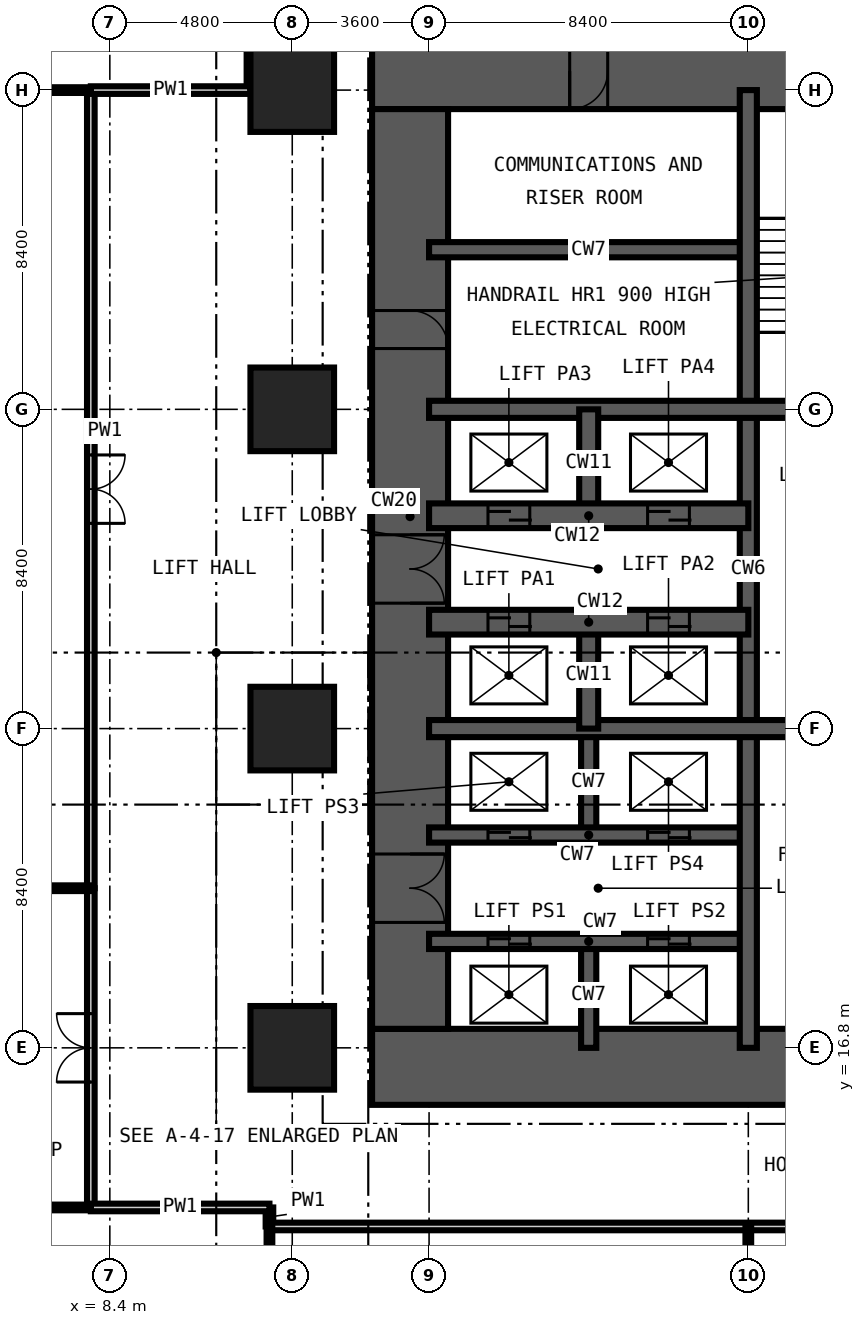
"""IFC4 building model, lengths in metres.
Left out: names, types, materials, properties, quantities, classifications, styles, units other than length and angle.
Written with IfcOpenShell. Run it as: python <this file> out.ifc"""

import sys

from ifc_helpers import new_model, si_unit, direction, frame, frame_2d, origin, origin_2d, place, context, subcontext, project, spatial, rectangle, extrude, element, fill, save


model = new_model("IFC4")
c1 = context("Model", 3, precision=1e-05, world=origin(), true_north=direction((0.0, 1.0)))
c2 = subcontext(c1, "Body", "Model", "MODEL_VIEW")
j1 = project(units=[si_unit("LENGTHUNIT", "METRE"), si_unit("PLANEANGLEUNIT", "RADIAN")], contexts=[c1])
p1 = place(None, origin())
s1 = spatial("IfcSite", under=j1, at=p1, CompositionType="ELEMENT")
p2 = place(p1, origin())
s2 = spatial("IfcBuilding", under=s1, at=p2, CompositionType="ELEMENT")
p3 = place(p2, origin())
s3 = spatial("IfcBuildingStorey", under=s2, at=p3, CompositionType="ELEMENT", Elevation=0.0)
for number, where, z_axis, x_axis in (
    (1, (13.2, 16.8, -0.3), (0.0, 0.0, 1.0), (1.0, 0.0, 0.0)),
    (2, (13.2, 25.2, -0.3), (0.0, 0.0, 1.0), (1.0, 0.0, 0.0)),
    (3, (13.2, 33.6, -0.3), (0.0, 0.0, 1.0), (1.0, 0.0, 0.0)),
    (4, (13.2, 42.0, -0.3), (0.0, 0.0, 1.0), (1.0, 0.0, 0.0)),
):
    element("IfcColumn", number, at=place(p3, frame(where, z_axis=z_axis, x_axis=x_axis)), inside=s3, PredefinedType="COLUMN", context=c2, shape_type="SweptSolid", body=[
        extrude(rectangle(XDim=2.2, YDim=2.2, at=origin_2d()), origin(), (0.0, 0.0, 1.0), 6.0),
    ])
p4 = place(p3, frame((15.3, 16.3, -0.3), z_axis=(0.0, 0.0, 1.0), x_axis=(1.0, 0.0, 0.0)))
e5 = element("IfcWall", 5, at=p4, inside=s3, PredefinedType="SHEAR", context=c2, shape_type="SweptSolid", body=[
    extrude(rectangle(XDim=28.2, YDim=2.0, at=frame_2d((14.1, 0.0))), origin(), (0.0, 0.0, 1.0), 6.0),
])
p5 = place(p4, frame((13.6, 0.0, 0.3)))
e6 = element("IfcOpeningElement", 6, at=p5, cuts=e5, PredefinedType="OPENING", context=c2, shape_type="SweptSolid", body=[
    extrude(rectangle(XDim=1.0, YDim=2.1, at=frame_2d((0.5, 1.05))), frame((0.0, 1.01, 0.0), z_axis=(0.0, -1.0, 0.0), x_axis=(1.0, 0.0, 0.0)), (0.0, 0.0, 1.0), 2.02),
])
p6 = place(p4, frame((19.9, 0.0, 0.3)))
e7 = element("IfcOpeningElement", 7, at=p6, cuts=e5, PredefinedType="OPENING", context=c2, shape_type="SweptSolid", body=[
    extrude(rectangle(XDim=1.0, YDim=2.1, at=frame_2d((0.5, 1.05))), frame((0.0, 1.01, 0.0), z_axis=(0.0, -1.0, 0.0), x_axis=(1.0, 0.0, 0.0)), (0.0, 0.0, 1.0), 2.02),
])
p7 = place(p3, frame((43.5, 42.5, -0.3), z_axis=(0.0, 0.0, 1.0), x_axis=(-1.0, 0.0, 0.0)))
e8 = element("IfcWall", 8, at=p7, inside=s3, PredefinedType="SHEAR", context=c2, shape_type="SweptSolid", body=[
    extrude(rectangle(XDim=28.2, YDim=2.0, at=frame_2d((14.1, 0.0))), origin(), (0.0, 0.0, 1.0), 6.0),
])
p8 = place(p7, frame((22.0, 0.0, 0.3)))
e9 = element("IfcOpeningElement", 9, at=p8, cuts=e8, PredefinedType="OPENING", context=c2, shape_type="SweptSolid", body=[
    extrude(rectangle(XDim=1.0, YDim=2.1, at=frame_2d((0.5, 1.05))), frame((0.0, 1.01, 0.0), z_axis=(0.0, -1.0, 0.0), x_axis=(1.0, 0.0, 0.0)), (0.0, 0.0, 1.0), 2.02),
])
p9 = place(p7, frame((11.4, 0.0, 0.3)))
e10 = element("IfcOpeningElement", 10, at=p9, cuts=e8, PredefinedType="OPENING", context=c2, shape_type="SweptSolid", body=[
    extrude(rectangle(XDim=1.2, YDim=2.2, at=frame_2d((0.6, 1.1))), frame((0.0, 1.01, 0.0), z_axis=(0.0, -1.0, 0.0), x_axis=(1.0, 0.0, 0.0)), (0.0, 0.0, 1.0), 2.02),
])
p10 = place(p3, frame((16.3, 41.5, -0.3), z_axis=(0.0, 0.0, 1.0), x_axis=(0.0, -1.0, 0.0)))
e11 = element("IfcWall", 11, at=p10, inside=s3, PredefinedType="SHEAR", context=c2, shape_type="SweptSolid", body=[
    extrude(rectangle(XDim=24.2, YDim=2.0, at=frame_2d((12.1, 0.0))), origin(), (0.0, 0.0, 1.0), 6.0),
])
p11 = place(p10, frame((11.2, 0.0, 0.3)))
e12 = element("IfcOpeningElement", 12, at=p11, cuts=e11, PredefinedType="OPENING", context=c2, shape_type="SweptSolid", body=[
    extrude(rectangle(XDim=1.8, YDim=2.2, at=frame_2d((0.9, 1.1))), frame((0.0, 1.01, 0.0), z_axis=(0.0, -1.0, 0.0), x_axis=(1.0, 0.0, 0.0)), (0.0, 0.0, 1.0), 2.02),
])
p12 = place(p10, frame((19.6, 0.0, 0.3)))
e13 = element("IfcOpeningElement", 13, at=p12, cuts=e11, PredefinedType="OPENING", context=c2, shape_type="SweptSolid", body=[
    extrude(rectangle(XDim=1.8, YDim=2.2, at=frame_2d((0.9, 1.1))), frame((0.0, 1.01, 0.0), z_axis=(0.0, -1.0, 0.0), x_axis=(1.0, 0.0, 0.0)), (0.0, 0.0, 1.0), 2.02),
])
p13 = place(p10, frame((5.3, 0.0, 0.3)))
e14 = element("IfcOpeningElement", 14, at=p13, cuts=e11, PredefinedType="OPENING", context=c2, shape_type="SweptSolid", body=[
    extrude(rectangle(XDim=1.0, YDim=2.1, at=frame_2d((0.5, 1.05))), frame((0.0, 1.01, 0.0), z_axis=(0.0, -1.0, 0.0), x_axis=(1.0, 0.0, 0.0)), (0.0, 0.0, 1.0), 2.02),
])
for number, where, z_axis, x_axis in (
    (15, (21.0, 16.8, -0.3), (0.0, 0.0, 1.0), (0.0, 1.0, 0.0)),
    (16, (21.0, 22.4, -0.3), (0.0, 0.0, 1.0), (0.0, 1.0, 0.0)),
):
    element("IfcWall", number, at=place(p3, frame(where, z_axis=z_axis, x_axis=x_axis)), inside=s3, PredefinedType="SHEAR", context=c2, shape_type="SweptSolid", body=[
        extrude(rectangle(XDim=2.8, YDim=0.4, at=frame_2d((1.4, 0.0))), origin(), (0.0, 0.0, 1.0), 6.0),
    ])
p14 = place(p3, frame((16.8, 19.6, -0.3), z_axis=(0.0, 0.0, 1.0), x_axis=(1.0, 0.0, 0.0)))
e17 = element("IfcWall", 17, at=p14, inside=s3, PredefinedType="SHEAR", context=c2, shape_type="SweptSolid", body=[
    extrude(rectangle(XDim=8.4, YDim=0.4, at=frame_2d((4.2, 0.0))), origin(), (0.0, 0.0, 1.0), 6.0),
])
p15 = place(p14, frame((1.55, 0.0, 0.3)))
e18 = element("IfcOpeningElement", 18, at=p15, cuts=e17, PredefinedType="OPENING", context=c2, shape_type="SweptSolid", body=[
    extrude(rectangle(XDim=1.1, YDim=2.2, at=frame_2d((0.55, 1.1))), frame((0.0, 0.21, 0.0), z_axis=(0.0, -1.0, 0.0), x_axis=(1.0, 0.0, 0.0)), (0.0, 0.0, 1.0), 0.42),
])
p16 = place(p14, frame((5.75, 0.0, 0.3)))
e19 = element("IfcOpeningElement", 19, at=p16, cuts=e17, PredefinedType="OPENING", context=c2, shape_type="SweptSolid", body=[
    extrude(rectangle(XDim=1.1, YDim=2.2, at=frame_2d((0.55, 1.1))), frame((0.0, 0.21, 0.0), z_axis=(0.0, -1.0, 0.0), x_axis=(1.0, 0.0, 0.0)), (0.0, 0.0, 1.0), 0.42),
])
p17 = place(p3, frame((16.8, 22.4, -0.3), z_axis=(0.0, 0.0, 1.0), x_axis=(1.0, 0.0, 0.0)))
e20 = element("IfcWall", 20, at=p17, inside=s3, PredefinedType="SHEAR", context=c2, shape_type="SweptSolid", body=[
    extrude(rectangle(XDim=8.4, YDim=0.4, at=frame_2d((4.2, 0.0))), origin(), (0.0, 0.0, 1.0), 6.0),
])
p18 = place(p17, frame((1.55, 0.0, 0.3)))
e21 = element("IfcOpeningElement", 21, at=p18, cuts=e20, PredefinedType="OPENING", context=c2, shape_type="SweptSolid", body=[
    extrude(rectangle(XDim=1.1, YDim=2.2, at=frame_2d((0.55, 1.1))), frame((0.0, 0.21, 0.0), z_axis=(0.0, -1.0, 0.0), x_axis=(1.0, 0.0, 0.0)), (0.0, 0.0, 1.0), 0.42),
])
p19 = place(p17, frame((5.75, 0.0, 0.3)))
e22 = element("IfcOpeningElement", 22, at=p19, cuts=e20, PredefinedType="OPENING", context=c2, shape_type="SweptSolid", body=[
    extrude(rectangle(XDim=1.1, YDim=2.2, at=frame_2d((0.55, 1.1))), frame((0.0, 0.21, 0.0), z_axis=(0.0, -1.0, 0.0), x_axis=(1.0, 0.0, 0.0)), (0.0, 0.0, 1.0), 0.42),
])
p20 = place(p3, frame((16.8, 37.8, -0.3), z_axis=(0.0, 0.0, 1.0), x_axis=(1.0, 0.0, 0.0)))
e23 = element("IfcWall", 23, at=p20, inside=s3, PredefinedType="SHEAR", context=c2, shape_type="SweptSolid", body=[
    extrude(rectangle(XDim=8.4, YDim=0.4, at=frame_2d((4.2, 0.0))), origin(), (0.0, 0.0, 1.0), 6.0),
])
for number, where, z_axis, x_axis in (
    (24, (25.2, 16.8, -0.3), (0.0, 0.0, 1.0), (0.0, 1.0, 0.0)),
    (25, (16.8, 25.2, -0.3), (0.0, 0.0, 1.0), (1.0, 0.0, 0.0)),
):
    element("IfcWall", number, at=place(p3, frame(where, z_axis=z_axis, x_axis=x_axis)), inside=s3, PredefinedType="SHEAR", context=c2, shape_type="SweptSolid", body=[
        extrude(rectangle(XDim=25.2, YDim=0.45, at=frame_2d((12.6, 0.0))), origin(), (0.0, 0.0, 1.0), 6.0),
    ])
p21 = place(p3, frame((16.8, 33.6, -0.3), z_axis=(0.0, 0.0, 1.0), x_axis=(1.0, 0.0, 0.0)))
e26 = element("IfcWall", 26, at=p21, inside=s3, PredefinedType="SHEAR", context=c2, shape_type="SweptSolid", body=[
    extrude(rectangle(XDim=25.2, YDim=0.45, at=frame_2d((12.6, 0.0))), origin(), (0.0, 0.0, 1.0), 6.0),
])
p22 = place(p21, frame((14.2, 0.0, 0.3)))
e27 = element("IfcOpeningElement", 27, at=p22, cuts=e26, PredefinedType="OPENING", context=c2, shape_type="SweptSolid", body=[
    extrude(rectangle(XDim=1.0, YDim=2.1, at=frame_2d((0.5, 1.05))), frame((0.0, 0.235, 0.0), z_axis=(0.0, -1.0, 0.0), x_axis=(1.0, 0.0, 0.0)), (0.0, 0.0, 1.0), 0.47),
])
p23 = place(p21, frame((22.6, 0.0, 0.3)))
e28 = element("IfcOpeningElement", 28, at=p23, cuts=e26, PredefinedType="OPENING", context=c2, shape_type="SweptSolid", body=[
    extrude(rectangle(XDim=1.0, YDim=2.1, at=frame_2d((0.5, 1.05))), frame((0.0, 0.235, 0.0), z_axis=(0.0, -1.0, 0.0), x_axis=(1.0, 0.0, 0.0)), (0.0, 0.0, 1.0), 0.47),
])
for number, where, z_axis, x_axis in (
    (29, (21.0, 25.2, -0.3), (0.0, 0.0, 1.0), (0.0, 1.0, 0.0)),
    (30, (21.0, 30.8, -0.3), (0.0, 0.0, 1.0), (0.0, 1.0, 0.0)),
):
    element("IfcWall", number, at=place(p3, frame(where, z_axis=z_axis, x_axis=x_axis)), inside=s3, PredefinedType="SHEAR", context=c2, shape_type="SweptSolid", body=[
        extrude(rectangle(XDim=2.8, YDim=0.5, at=frame_2d((1.4, 0.0))), origin(), (0.0, 0.0, 1.0), 6.0),
    ])
p24 = place(p3, frame((16.8, 28.0, -0.3), z_axis=(0.0, 0.0, 1.0), x_axis=(1.0, 0.0, 0.0)))
e31 = element("IfcWall", 31, at=p24, inside=s3, PredefinedType="SHEAR", context=c2, shape_type="SweptSolid", body=[
    extrude(rectangle(XDim=8.4, YDim=0.65, at=frame_2d((4.2, 0.0))), origin(), (0.0, 0.0, 1.0), 6.0),
])
p25 = place(p24, frame((1.55, 0.0, 0.3)))
e32 = element("IfcOpeningElement", 32, at=p25, cuts=e31, PredefinedType="OPENING", context=c2, shape_type="SweptSolid", body=[
    extrude(rectangle(XDim=1.1, YDim=2.2, at=frame_2d((0.55, 1.1))), frame((0.0, 0.335, 0.0), z_axis=(0.0, -1.0, 0.0), x_axis=(1.0, 0.0, 0.0)), (0.0, 0.0, 1.0), 0.67),
])
p26 = place(p24, frame((5.75, 0.0, 0.3)))
e33 = element("IfcOpeningElement", 33, at=p26, cuts=e31, PredefinedType="OPENING", context=c2, shape_type="SweptSolid", body=[
    extrude(rectangle(XDim=1.1, YDim=2.2, at=frame_2d((0.55, 1.1))), frame((0.0, 0.335, 0.0), z_axis=(0.0, -1.0, 0.0), x_axis=(1.0, 0.0, 0.0)), (0.0, 0.0, 1.0), 0.67),
])
p27 = place(p3, frame((16.8, 30.8, -0.3), z_axis=(0.0, 0.0, 1.0), x_axis=(1.0, 0.0, 0.0)))
e34 = element("IfcWall", 34, at=p27, inside=s3, PredefinedType="SHEAR", context=c2, shape_type="SweptSolid", body=[
    extrude(rectangle(XDim=8.4, YDim=0.65, at=frame_2d((4.2, 0.0))), origin(), (0.0, 0.0, 1.0), 6.0),
])
p28 = place(p27, frame((1.55, 0.0, 0.3)))
e35 = element("IfcOpeningElement", 35, at=p28, cuts=e34, PredefinedType="OPENING", context=c2, shape_type="SweptSolid", body=[
    extrude(rectangle(XDim=1.1, YDim=2.2, at=frame_2d((0.55, 1.1))), frame((0.0, 0.335, 0.0), z_axis=(0.0, -1.0, 0.0), x_axis=(1.0, 0.0, 0.0)), (0.0, 0.0, 1.0), 0.67),
])
p29 = place(p27, frame((5.75, 0.0, 0.3)))
e36 = element("IfcOpeningElement", 36, at=p29, cuts=e34, PredefinedType="OPENING", context=c2, shape_type="SweptSolid", body=[
    extrude(rectangle(XDim=1.1, YDim=2.2, at=frame_2d((0.55, 1.1))), frame((0.0, 0.335, 0.0), z_axis=(0.0, -1.0, 0.0), x_axis=(1.0, 0.0, 0.0)), (0.0, 0.0, 1.0), 0.67),
])
p30 = place(p3, frame((7.9, 12.6, 0.0), z_axis=(0.0, 0.0, 1.0), x_axis=(0.0, 1.0, 0.0)))
e37 = element("IfcWall", 37, at=p30, inside=s3, PredefinedType="PARTITIONING", context=c2, shape_type="SweptSolid", body=[
    extrude(rectangle(XDim=8.4, YDim=0.2, at=frame_2d((4.2, 0.0))), origin(), (0.0, 0.0, 1.0), 5.7),
])
p31 = place(p30, frame((3.3, 0.0, 0.0)))
e38 = element("IfcOpeningElement", 38, at=p31, cuts=e37, PredefinedType="OPENING", context=c2, shape_type="SweptSolid", body=[
    extrude(rectangle(XDim=1.8, YDim=2.4, at=frame_2d((0.9, 1.2))), frame((0.0, 0.11, 0.0), z_axis=(0.0, -1.0, 0.0), x_axis=(1.0, 0.0, 0.0)), (0.0, 0.0, 1.0), 0.22),
])
p32 = place(p3, frame((12.6, 12.1, 0.0), z_axis=(0.0, 0.0, 1.0), x_axis=(0.0, 1.0, 0.0)))
e39 = element("IfcWall", 39, at=p32, inside=s3, PredefinedType="PARTITIONING", context=c2, shape_type="SweptSolid", body=[
    extrude(rectangle(XDim=0.5, YDim=0.2, at=frame_2d((0.25, 0.0))), origin(), (0.0, 0.0, 1.0), 5.7),
])
p33 = place(p3, frame((12.6, 12.1, 0.0), z_axis=(0.0, 0.0, 1.0), x_axis=(1.0, 0.0, 0.0)))
e40 = element("IfcWall", 40, at=p33, inside=s3, PredefinedType="PARTITIONING", context=c2, shape_type="SweptSolid", body=[
    extrude(rectangle(XDim=33.6, YDim=0.2, at=frame_2d((16.8, 0.0))), origin(), (0.0, 0.0, 1.0), 5.7),
])
p34 = place(p3, frame((7.9, 12.6, 0.0), z_axis=(0.0, 0.0, 1.0), x_axis=(1.0, 0.0, 0.0)))
e41 = element("IfcWall", 41, at=p34, inside=s3, PredefinedType="PARTITIONING", context=c2, shape_type="SweptSolid", body=[
    extrude(rectangle(XDim=4.7, YDim=0.2, at=frame_2d((2.35, 0.0))), origin(), (0.0, 0.0, 1.0), 5.7),
])
p35 = place(p3, frame((7.9, 42.0, 0.0), z_axis=(0.0, 0.0, 1.0), x_axis=(0.0, -1.0, 0.0)))
e42 = element("IfcWall", 42, at=p35, inside=s3, PredefinedType="PARTITIONING", context=c2, shape_type="SweptSolid", body=[
    extrude(rectangle(XDim=21.0, YDim=0.2, at=frame_2d((10.5, 0.0))), origin(), (0.0, 0.0, 1.0), 5.7),
])
p36 = place(p35, frame((9.6, 0.0, 0.0)))
e43 = element("IfcOpeningElement", 43, at=p36, cuts=e42, PredefinedType="OPENING", context=c2, shape_type="SweptSolid", body=[
    extrude(rectangle(XDim=1.8, YDim=2.4, at=frame_2d((0.9, 1.2))), frame((0.0, 0.11, 0.0), z_axis=(0.0, -1.0, 0.0), x_axis=(1.0, 0.0, 0.0)), (0.0, 0.0, 1.0), 0.22),
])
p37 = place(p3, frame((12.1, 58.8, 0.0), z_axis=(0.0, 0.0, 1.0), x_axis=(0.0, -1.0, 0.0)))
e44 = element("IfcWall", 44, at=p37, inside=s3, PredefinedType="PARTITIONING", context=c2, shape_type="SweptSolid", body=[
    extrude(rectangle(XDim=16.8, YDim=0.2, at=frame_2d((8.4, 0.0))), origin(), (0.0, 0.0, 1.0), 5.7),
])
p38 = place(p37, frame((5.4, 0.0, 0.0)))
e45 = element("IfcOpeningElement", 45, at=p38, cuts=e44, PredefinedType="OPENING", context=c2, shape_type="SweptSolid", body=[
    extrude(rectangle(XDim=1.8, YDim=2.4, at=frame_2d((0.9, 1.2))), frame((0.0, 0.11, 0.0), z_axis=(0.0, -1.0, 0.0), x_axis=(1.0, 0.0, 0.0)), (0.0, 0.0, 1.0), 0.22),
])
p39 = place(p3, frame((12.1, 42.0, 0.0), z_axis=(0.0, 0.0, 1.0), x_axis=(-1.0, 0.0, 0.0)))
e46 = element("IfcWall", 46, at=p39, inside=s3, PredefinedType="PARTITIONING", context=c2, shape_type="SweptSolid", body=[
    extrude(rectangle(XDim=4.2, YDim=0.2, at=frame_2d((2.1, 0.0))), origin(), (0.0, 0.0, 1.0), 5.7),
])
for number, where, z_axis, x_axis in (
    (47, (12.6, 2.4, 0.0), (0.0, 0.0, 1.0), (0.0, 1.0, 0.0)),
    (48, (25.2, 2.4, 0.0), (0.0, 0.0, 1.0), (0.0, 1.0, 0.0)),
):
    element("IfcWall", number, at=place(p3, frame(where, z_axis=z_axis, x_axis=x_axis)), inside=s3, PredefinedType="PARTITIONING", context=c2, shape_type="SweptSolid", body=[
        extrude(rectangle(XDim=9.7, YDim=0.15, at=frame_2d((4.85, 0.0))), origin(), (0.0, 0.0, 1.0), 5.7),
    ])
for number, where, z_axis, x_axis in (
    (49, (0.0, 12.6, 0.0), (0.0, 0.0, 1.0), (1.0, 0.0, 0.0)),
    (50, (0.0, 21.0, 0.0), (0.0, 0.0, 1.0), (1.0, 0.0, 0.0)),
    (51, (0.0, 42.0, 0.0), (0.0, 0.0, 1.0), (1.0, 0.0, 0.0)),
):
    element("IfcWall", number, at=place(p3, frame(where, z_axis=z_axis, x_axis=x_axis)), inside=s3, PredefinedType="PARTITIONING", context=c2, shape_type="SweptSolid", body=[
        extrude(rectangle(XDim=7.9, YDim=0.15, at=frame_2d((3.95, 0.0))), origin(), (0.0, 0.0, 1.0), 5.7),
    ])
p40 = place(p25, origin())
e52 = element("IfcDoor", 52, at=p40, inside=s3, OperationType="DOUBLE_DOOR_SLIDING", PredefinedType="DOOR", context=c2, shape_type="SweptSolid", body=[
    extrude(rectangle(XDim=1.1, YDim=2.2, at=frame_2d((0.55, 1.1))), frame((0.0, 0.025, 0.0), z_axis=(0.0, -1.0, 0.0), x_axis=(1.0, 0.0, 0.0)), (0.0, 0.0, 1.0), 0.05),
])
fill(e32, e52)
p41 = place(p26, origin())
e53 = element("IfcDoor", 53, at=p41, inside=s3, OperationType="DOUBLE_DOOR_SLIDING", PredefinedType="DOOR", context=c2, shape_type="SweptSolid", body=[
    extrude(rectangle(XDim=1.1, YDim=2.2, at=frame_2d((0.55, 1.1))), frame((0.0, 0.025, 0.0), z_axis=(0.0, -1.0, 0.0), x_axis=(1.0, 0.0, 0.0)), (0.0, 0.0, 1.0), 0.05),
])
fill(e33, e53)
p42 = place(p28, origin())
e54 = element("IfcDoor", 54, at=p42, inside=s3, OperationType="DOUBLE_DOOR_SLIDING", PredefinedType="DOOR", context=c2, shape_type="SweptSolid", body=[
    extrude(rectangle(XDim=1.1, YDim=2.2, at=frame_2d((0.55, 1.1))), frame((0.0, 0.025, 0.0), z_axis=(0.0, -1.0, 0.0), x_axis=(1.0, 0.0, 0.0)), (0.0, 0.0, 1.0), 0.05),
])
fill(e35, e54)
p43 = place(p29, origin())
e55 = element("IfcDoor", 55, at=p43, inside=s3, OperationType="DOUBLE_DOOR_SLIDING", PredefinedType="DOOR", context=c2, shape_type="SweptSolid", body=[
    extrude(rectangle(XDim=1.1, YDim=2.2, at=frame_2d((0.55, 1.1))), frame((0.0, 0.025, 0.0), z_axis=(0.0, -1.0, 0.0), x_axis=(1.0, 0.0, 0.0)), (0.0, 0.0, 1.0), 0.05),
])
fill(e36, e55)
p44 = place(p15, origin())
e56 = element("IfcDoor", 56, at=p44, inside=s3, OperationType="DOUBLE_DOOR_SLIDING", PredefinedType="DOOR", context=c2, shape_type="SweptSolid", body=[
    extrude(rectangle(XDim=1.1, YDim=2.2, at=frame_2d((0.55, 1.1))), frame((0.0, 0.025, 0.0), z_axis=(0.0, -1.0, 0.0), x_axis=(1.0, 0.0, 0.0)), (0.0, 0.0, 1.0), 0.05),
])
fill(e18, e56)
p45 = place(p16, origin())
e57 = element("IfcDoor", 57, at=p45, inside=s3, OperationType="DOUBLE_DOOR_SLIDING", PredefinedType="DOOR", context=c2, shape_type="SweptSolid", body=[
    extrude(rectangle(XDim=1.1, YDim=2.2, at=frame_2d((0.55, 1.1))), frame((0.0, 0.025, 0.0), z_axis=(0.0, -1.0, 0.0), x_axis=(1.0, 0.0, 0.0)), (0.0, 0.0, 1.0), 0.05),
])
fill(e19, e57)
p46 = place(p18, origin())
e58 = element("IfcDoor", 58, at=p46, inside=s3, OperationType="DOUBLE_DOOR_SLIDING", PredefinedType="DOOR", context=c2, shape_type="SweptSolid", body=[
    extrude(rectangle(XDim=1.1, YDim=2.2, at=frame_2d((0.55, 1.1))), frame((0.0, 0.025, 0.0), z_axis=(0.0, -1.0, 0.0), x_axis=(1.0, 0.0, 0.0)), (0.0, 0.0, 1.0), 0.05),
])
fill(e21, e58)
p47 = place(p19, origin())
e59 = element("IfcDoor", 59, at=p47, inside=s3, OperationType="DOUBLE_DOOR_SLIDING", PredefinedType="DOOR", context=c2, shape_type="SweptSolid", body=[
    extrude(rectangle(XDim=1.1, YDim=2.2, at=frame_2d((0.55, 1.1))), frame((0.0, 0.025, 0.0), z_axis=(0.0, -1.0, 0.0), x_axis=(1.0, 0.0, 0.0)), (0.0, 0.0, 1.0), 0.05),
])
fill(e22, e59)
p48 = place(p11, origin())
e60 = element("IfcDoor", 60, at=p48, inside=s3, OperationType="DOUBLE_DOOR_DOUBLE_SWING", PredefinedType="DOOR", context=c2, shape_type="SweptSolid", body=[
    extrude(rectangle(XDim=1.8, YDim=2.2, at=frame_2d((0.9, 1.1))), frame((0.0, 0.025, 0.0), z_axis=(0.0, -1.0, 0.0), x_axis=(1.0, 0.0, 0.0)), (0.0, 0.0, 1.0), 0.05),
])
fill(e12, e60)
p49 = place(p12, origin())
e61 = element("IfcDoor", 61, at=p49, inside=s3, OperationType="DOUBLE_DOOR_DOUBLE_SWING", PredefinedType="DOOR", context=c2, shape_type="SweptSolid", body=[
    extrude(rectangle(XDim=1.8, YDim=2.2, at=frame_2d((0.9, 1.1))), frame((0.0, 0.025, 0.0), z_axis=(0.0, -1.0, 0.0), x_axis=(1.0, 0.0, 0.0)), (0.0, 0.0, 1.0), 0.05),
])
fill(e13, e61)
p50 = place(p13, origin())
e62 = element("IfcDoor", 62, at=p50, inside=s3, OperationType="SINGLE_SWING_RIGHT", PredefinedType="DOOR", context=c2, shape_type="SweptSolid", body=[
    extrude(rectangle(XDim=1.0, YDim=2.1, at=frame_2d((0.5, 1.05))), frame((0.0, 0.025, 0.0), z_axis=(0.0, -1.0, 0.0), x_axis=(1.0, 0.0, 0.0)), (0.0, 0.0, 1.0), 0.05),
])
fill(e14, e62)
p51 = place(p8, origin())
e63 = element("IfcDoor", 63, at=p51, inside=s3, OperationType="SINGLE_SWING_RIGHT", PredefinedType="DOOR", context=c2, shape_type="SweptSolid", body=[
    extrude(rectangle(XDim=1.0, YDim=2.1, at=frame_2d((0.5, 1.05))), frame((0.0, 0.025, 0.0), z_axis=(0.0, -1.0, 0.0), x_axis=(1.0, 0.0, 0.0)), (0.0, 0.0, 1.0), 0.05),
])
fill(e9, e63)
p52 = place(p31, origin())
e64 = element("IfcDoor", 64, at=p52, inside=s3, OperationType="DOUBLE_DOOR_DOUBLE_SWING", PredefinedType="DOOR", context=c2, shape_type="SweptSolid", body=[
    extrude(rectangle(XDim=1.8, YDim=2.4, at=frame_2d((0.9, 1.2))), frame((0.0, 0.025, 0.0), z_axis=(0.0, -1.0, 0.0), x_axis=(1.0, 0.0, 0.0)), (0.0, 0.0, 1.0), 0.05),
])
fill(e38, e64)
p53 = place(p36, origin())
e65 = element("IfcDoor", 65, at=p53, inside=s3, OperationType="DOUBLE_DOOR_DOUBLE_SWING", PredefinedType="DOOR", context=c2, shape_type="SweptSolid", body=[
    extrude(rectangle(XDim=1.8, YDim=2.4, at=frame_2d((0.9, 1.2))), frame((0.0, 0.025, 0.0), z_axis=(0.0, -1.0, 0.0), x_axis=(1.0, 0.0, 0.0)), (0.0, 0.0, 1.0), 0.05),
])
fill(e43, e65)
save(model, sys.argv[1])
